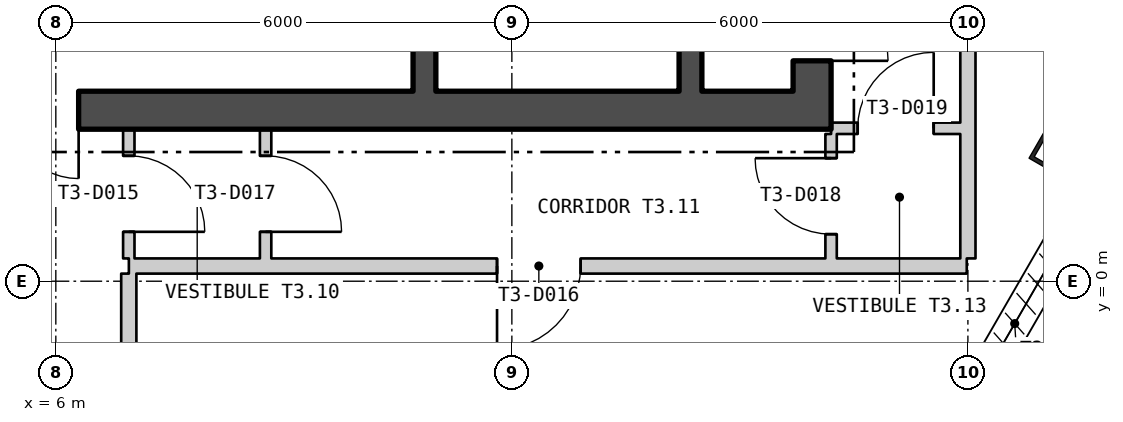
"""IFC4 building model, lengths in metres.
Left out: names, types, materials, properties, quantities, classifications, styles, units other than length and angle.
Written with IfcOpenShell. Run it as: python <this file> out.ifc"""

import sys

from ifc_helpers import new_model, si_unit, direction, frame, frame_2d, origin, origin_2d, place, context, subcontext, project, spatial, polyline, rectangle, hollow_rectangle, outline, extrude, element, fill, save


model = new_model("IFC4")
c1 = context("Model", 3, precision=1e-05, world=origin(), true_north=direction((0.0, 1.0)))
c2 = subcontext(c1, "Body", "Model", "MODEL_VIEW")
j1 = project(units=[si_unit("LENGTHUNIT", "METRE"), si_unit("PLANEANGLEUNIT", "RADIAN")], contexts=[c1])
p1 = place(None, origin())
s1 = spatial("IfcSite", under=j1, at=p1, CompositionType="ELEMENT")
p2 = place(p1, origin())
s2 = spatial("IfcBuilding", under=s1, at=p2, CompositionType="ELEMENT")
p3 = place(p2, frame((0.0, 0.0, 186.6)))
s3 = spatial("IfcBuildingStorey", under=s2, at=p3, CompositionType="ELEMENT", Elevation=186.6)
p4 = place(p3, frame((19.245, 1.682, 0.0), z_axis=(0.0, 0.0, 1.0), x_axis=(0.5, 0.866025403784, 0.0)))
e1 = element("IfcColumn", 1, at=p4, inside=s3, PredefinedType="COLUMN", context=c2, shape_type="SweptSolid", body=[
    extrude(hollow_rectangle(XDim=0.55, YDim=0.7, WallThickness=0.05, at=origin_2d()), origin(), (0.0, 0.0, 1.0), 6.0),
])
p5 = place(p3, frame((3.8, -26.219, -0.18), z_axis=(0.0, 0.0, 1.0), x_axis=(0.500000711659, 0.866024992908, 0.0)))
e2 = element("IfcWall", 2, at=p5, inside=s3, PredefinedType="SOLIDWALL", context=c2, shape_type="SweptSolid", body=[
    extrude(outline(polyline([(-0.13, -0.225), (45.87, -0.225), (45.61, 0.225), (0.13, 0.225), (-0.13, -0.225)])), origin(), (0.0, 0.0, 1.0), 6.0),
])
p6 = place(p5, frame((1.424, 0.0, 1.38)))
e3 = element("IfcOpeningElement", 3, at=p6, cuts=e2, PredefinedType="OPENING", context=c2, shape_type="SweptSolid", body=[
    extrude(rectangle(XDim=2.4, YDim=3.6, at=frame_2d((1.2, 1.8))), frame((0.0, 0.235, 0.0), z_axis=(0.0, -1.0, 0.0), x_axis=(1.0, 0.0, 0.0)), (0.0, 0.0, 1.0), 0.47),
])
p7 = place(p5, frame((5.893, 0.0, 1.38)))
e4 = element("IfcOpeningElement", 4, at=p7, cuts=e2, PredefinedType="OPENING", context=c2, shape_type="SweptSolid", body=[
    extrude(rectangle(XDim=2.4, YDim=3.6, at=frame_2d((1.2, 1.8))), frame((0.0, 0.235, 0.0), z_axis=(0.0, -1.0, 0.0), x_axis=(1.0, 0.0, 0.0)), (0.0, 0.0, 1.0), 0.47),
])
p8 = place(p5, frame((10.401, 0.0, 1.38)))
e5 = element("IfcOpeningElement", 5, at=p8, cuts=e2, PredefinedType="OPENING", context=c2, shape_type="SweptSolid", body=[
    extrude(rectangle(XDim=2.4, YDim=3.6, at=frame_2d((1.2, 1.8))), frame((0.0, 0.235, 0.0), z_axis=(0.0, -1.0, 0.0), x_axis=(1.0, 0.0, 0.0)), (0.0, 0.0, 1.0), 0.47),
])
p9 = place(p5, frame((14.909, 0.0, 1.38)))
e6 = element("IfcOpeningElement", 6, at=p9, cuts=e2, PredefinedType="OPENING", context=c2, shape_type="SweptSolid", body=[
    extrude(rectangle(XDim=2.4, YDim=3.6, at=frame_2d((1.2, 1.8))), frame((0.0, 0.235, 0.0), z_axis=(0.0, -1.0, 0.0), x_axis=(1.0, 0.0, 0.0)), (0.0, 0.0, 1.0), 0.47),
])
p10 = place(p5, frame((19.416, 0.0, 1.38)))
e7 = element("IfcOpeningElement", 7, at=p10, cuts=e2, PredefinedType="OPENING", context=c2, shape_type="SweptSolid", body=[
    extrude(rectangle(XDim=2.4, YDim=3.6, at=frame_2d((1.2, 1.8))), frame((0.0, 0.235, 0.0), z_axis=(0.0, -1.0, 0.0), x_axis=(1.0, 0.0, 0.0)), (0.0, 0.0, 1.0), 0.47),
])
p11 = place(p5, frame((23.924, 0.0, 1.38)))
e8 = element("IfcOpeningElement", 8, at=p11, cuts=e2, PredefinedType="OPENING", context=c2, shape_type="SweptSolid", body=[
    extrude(rectangle(XDim=2.4, YDim=3.6, at=frame_2d((1.2, 1.8))), frame((0.0, 0.235, 0.0), z_axis=(0.0, -1.0, 0.0), x_axis=(1.0, 0.0, 0.0)), (0.0, 0.0, 1.0), 0.47),
])
p12 = place(p5, frame((28.431, 0.0, 1.38)))
e9 = element("IfcOpeningElement", 9, at=p12, cuts=e2, PredefinedType="OPENING", context=c2, shape_type="SweptSolid", body=[
    extrude(rectangle(XDim=2.4, YDim=3.6, at=frame_2d((1.2, 1.8))), frame((0.0, 0.235, 0.0), z_axis=(0.0, -1.0, 0.0), x_axis=(1.0, 0.0, 0.0)), (0.0, 0.0, 1.0), 0.47),
])
p13 = place(p5, frame((32.939, 0.0, 1.38)))
e10 = element("IfcOpeningElement", 10, at=p13, cuts=e2, PredefinedType="OPENING", context=c2, shape_type="SweptSolid", body=[
    extrude(rectangle(XDim=2.4, YDim=3.6, at=frame_2d((1.2, 1.8))), frame((0.0, 0.235, 0.0), z_axis=(0.0, -1.0, 0.0), x_axis=(1.0, 0.0, 0.0)), (0.0, 0.0, 1.0), 0.47),
])
p14 = place(p5, frame((37.447, 0.0, 1.38)))
e11 = element("IfcOpeningElement", 11, at=p14, cuts=e2, PredefinedType="OPENING", context=c2, shape_type="SweptSolid", body=[
    extrude(rectangle(XDim=2.4, YDim=3.6, at=frame_2d((1.2, 1.8))), frame((0.0, 0.235, 0.0), z_axis=(0.0, -1.0, 0.0), x_axis=(1.0, 0.0, 0.0)), (0.0, 0.0, 1.0), 0.47),
])
p15 = place(p5, frame((41.916, 0.0, 1.38)))
e12 = element("IfcOpeningElement", 12, at=p15, cuts=e2, PredefinedType="OPENING", context=c2, shape_type="SweptSolid", body=[
    extrude(rectangle(XDim=2.4, YDim=3.6, at=frame_2d((1.2, 1.8))), frame((0.0, 0.235, 0.0), z_axis=(0.0, -1.0, 0.0), x_axis=(1.0, 0.0, 0.0)), (0.0, 0.0, 1.0), 0.47),
])
p16 = place(p3, frame((-16.2, 2.25, 0.0), z_axis=(0.0, 0.0, 1.0), x_axis=(1.0, 0.0, 0.0)))
e13 = element("IfcWall", 13, at=p16, inside=s3, PredefinedType="SHEAR", context=c2, shape_type="SweptSolid", body=[
    extrude(rectangle(XDim=32.4, YDim=0.5, at=frame_2d((16.2, 0.0))), origin(), (0.0, 0.0, 1.0), 5.8),
])
p17 = place(p16, frame((10.7, 0.0, 0.0)))
e14 = element("IfcOpeningElement", 14, at=p17, cuts=e13, PredefinedType="OPENING", context=c2, shape_type="SweptSolid", body=[
    extrude(rectangle(XDim=1.8, YDim=2.4, at=frame_2d((0.9, 1.2))), frame((0.0, 0.26, 0.0), z_axis=(0.0, -1.0, 0.0), x_axis=(1.0, 0.0, 0.0)), (0.0, 0.0, 1.0), 0.52),
])
p18 = place(p16, frame((20.7, 0.0, 0.0)))
e15 = element("IfcOpeningElement", 15, at=p18, cuts=e13, PredefinedType="OPENING", context=c2, shape_type="SweptSolid", body=[
    extrude(rectangle(XDim=1.8, YDim=2.4, at=frame_2d((0.9, 1.2))), frame((0.0, 0.26, 0.0), z_axis=(0.0, -1.0, 0.0), x_axis=(1.0, 0.0, 0.0)), (0.0, 0.0, 1.0), 0.52),
])
p19 = place(p3, frame((15.95, 2.5, 0.0), z_axis=(0.0, 0.0, 1.0), x_axis=(0.0, 1.0, 0.0)))
e16 = element("IfcWall", 16, at=p19, inside=s3, PredefinedType="SHEAR", context=c2, shape_type="SweptSolid", body=[
    extrude(rectangle(XDim=15.0, YDim=0.5, at=frame_2d((7.5, 0.0))), origin(), (0.0, 0.0, 1.0), 5.8),
])
p20 = place(p19, frame((4.35, 0.0, 0.0)))
e17 = element("IfcOpeningElement", 17, at=p20, cuts=e16, PredefinedType="OPENING", context=c2, shape_type="SweptSolid", body=[
    extrude(rectangle(XDim=1.5, YDim=2.1, at=frame_2d((0.75, 1.05))), frame((0.0, 0.26, 0.0), z_axis=(0.0, -1.0, 0.0), x_axis=(1.0, 0.0, 0.0)), (0.0, 0.0, 1.0), 0.52),
])
p21 = place(p19, frame((0.4, 0.0, 0.0)))
e18 = element("IfcOpeningElement", 18, at=p21, cuts=e16, PredefinedType="OPENING", context=c2, shape_type="SweptSolid", body=[
    extrude(rectangle(XDim=1.0, YDim=2.1, at=frame_2d((0.5, 1.05))), frame((0.0, 0.26, 0.0), z_axis=(0.0, -1.0, 0.0), x_axis=(1.0, 0.0, 0.0)), (0.0, 0.0, 1.0), 0.52),
])
p22 = place(p19, frame((2.563, 0.0, 0.0)))
e19 = element("IfcOpeningElement", 19, at=p22, cuts=e16, PredefinedType="OPENING", context=c2, shape_type="SweptSolid", body=[
    extrude(rectangle(XDim=0.9, YDim=2.1, at=frame_2d((0.45, 1.05))), frame((0.0, 0.26, 0.0), z_axis=(0.0, -1.0, 0.0), x_axis=(1.0, 0.0, 0.0)), (0.0, 0.0, 1.0), 0.52),
])
p23 = place(p19, frame((7.409, 0.0, 0.0)))
e20 = element("IfcOpeningElement", 20, at=p23, cuts=e16, PredefinedType="OPENING", context=c2, shape_type="SweptSolid", body=[
    extrude(rectangle(XDim=0.9, YDim=2.1, at=frame_2d((0.45, 1.05))), frame((0.0, 0.26, 0.0), z_axis=(0.0, -1.0, 0.0), x_axis=(1.0, 0.0, 0.0)), (0.0, 0.0, 1.0), 0.52),
])
p24 = place(p19, frame((11.984, 0.0, 0.0)))
e21 = element("IfcOpeningElement", 21, at=p24, cuts=e16, PredefinedType="OPENING", context=c2, shape_type="SweptSolid", body=[
    extrude(rectangle(XDim=0.9, YDim=2.1, at=frame_2d((0.45, 1.05))), frame((0.0, 0.26, 0.0), z_axis=(0.0, -1.0, 0.0), x_axis=(1.0, 0.0, 0.0)), (0.0, 0.0, 1.0), 0.52),
])
p25 = place(p3, frame((10.85, 2.5, 0.0), z_axis=(0.0, 0.0, 1.0), x_axis=(0.0, 1.0, 0.0)))
e22 = element("IfcWall", 22, at=p25, inside=s3, PredefinedType="SHEAR", context=c2, shape_type="SweptSolid", body=[
    extrude(rectangle(XDim=15.0, YDim=0.3, at=frame_2d((7.5, 0.0))), origin(), (0.0, 0.0, 1.0), 5.8),
])
p26 = place(p25, frame((3.475, 0.0, 0.0)))
e23 = element("IfcOpeningElement", 23, at=p26, cuts=e22, PredefinedType="OPENING", context=c2, shape_type="SweptSolid", body=[
    extrude(rectangle(XDim=1.25, YDim=2.1, at=frame_2d((0.625, 1.05))), frame((0.0, 0.16, 0.0), z_axis=(0.0, -1.0, 0.0), x_axis=(1.0, 0.0, 0.0)), (0.0, 0.0, 1.0), 0.32),
])
p27 = place(p25, frame((1.125, 0.0, 0.0)))
e24 = element("IfcOpeningElement", 24, at=p27, cuts=e22, PredefinedType="OPENING", context=c2, shape_type="SweptSolid", body=[
    extrude(rectangle(XDim=1.0, YDim=2.1, at=frame_2d((0.5, 1.05))), frame((0.0, 0.16, 0.0), z_axis=(0.0, -1.0, 0.0), x_axis=(1.0, 0.0, 0.0)), (0.0, 0.0, 1.0), 0.32),
])
p28 = place(p3, frame((14.35, 2.5, 0.0), z_axis=(0.0, 0.0, 1.0), x_axis=(0.0, 1.0, 0.0)))
e25 = element("IfcWall", 25, at=p28, inside=s3, PredefinedType="SHEAR", context=c2, shape_type="SweptSolid", body=[
    extrude(rectangle(XDim=15.0, YDim=0.3, at=frame_2d((7.5, 0.0))), origin(), (0.0, 0.0, 1.0), 5.8),
])
p29 = place(p28, frame((4.35, 0.0, 0.0)))
e26 = element("IfcOpeningElement", 26, at=p29, cuts=e25, PredefinedType="OPENING", context=c2, shape_type="SweptSolid", body=[
    extrude(rectangle(XDim=1.5, YDim=2.1, at=frame_2d((0.75, 1.05))), frame((0.0, 0.16, 0.0), z_axis=(0.0, -1.0, 0.0), x_axis=(1.0, 0.0, 0.0)), (0.0, 0.0, 1.0), 0.32),
])
p30 = place(p3, frame((6.96, -1.1, 0.0), z_axis=(0.0, 0.0, 1.0), x_axis=(0.0, 1.0, 0.0)))
e27 = element("IfcWall", 27, at=p30, inside=s3, PredefinedType="PARTITIONING", context=c2, shape_type="SweptSolid", body=[
    extrude(rectangle(XDim=1.2, YDim=0.2, at=frame_2d((0.6, 0.0))), origin(), (0.0, 0.0, 1.0), 5.8),
])
p31 = place(p3, frame((6.96, 0.3, 0.0), z_axis=(0.0, 0.0, 1.0), x_axis=(0.0, 1.0, 0.0)))
e28 = element("IfcWall", 28, at=p31, inside=s3, PredefinedType="PARTITIONING", context=c2, shape_type="SweptSolid", body=[
    extrude(rectangle(XDim=1.7, YDim=0.15, at=frame_2d((0.85, 0.0))), origin(), (0.0, 0.0, 1.0), 5.8),
])
p32 = place(p31, frame((0.35, 0.0, 0.0)))
e29 = element("IfcOpeningElement", 29, at=p32, cuts=e28, PredefinedType="OPENING", context=c2, shape_type="SweptSolid", body=[
    extrude(rectangle(XDim=1.0, YDim=2.1, at=frame_2d((0.5, 1.05))), frame((0.0, 0.085, 0.0), z_axis=(0.0, -1.0, 0.0), x_axis=(1.0, 0.0, 0.0)), (0.0, 0.0, 1.0), 0.17),
])
p33 = place(p3, frame((6.961, 0.2, 0.0), z_axis=(0.0, 0.0, 1.0), x_axis=(1.0, 0.0, 0.0)))
e30 = element("IfcWall", 30, at=p33, inside=s3, PredefinedType="PARTITIONING", context=c2, shape_type="SweptSolid", body=[
    extrude(rectangle(XDim=11.024, YDim=0.2, at=frame_2d((5.512, 0.0))), origin(), (0.0, 0.0, 1.0), 5.8),
])
p34 = place(p33, frame((4.844, 0.0, 0.0)))
e31 = element("IfcOpeningElement", 31, at=p34, cuts=e30, PredefinedType="OPENING", context=c2, shape_type="SweptSolid", body=[
    extrude(rectangle(XDim=1.1, YDim=2.1, at=frame_2d((0.55, 1.05))), frame((0.0, 0.11, 0.0), z_axis=(0.0, -1.0, 0.0), x_axis=(1.0, 0.0, 0.0)), (0.0, 0.0, 1.0), 0.22),
])
p35 = place(p3, frame((8.76, 0.3, 0.0), z_axis=(0.0, 0.0, 1.0), x_axis=(0.0, 1.0, 0.0)))
e32 = element("IfcWall", 32, at=p35, inside=s3, PredefinedType="PARTITIONING", context=c2, shape_type="SweptSolid", body=[
    extrude(rectangle(XDim=1.7, YDim=0.15, at=frame_2d((0.85, 0.0))), origin(), (0.0, 0.0, 1.0), 5.8),
])
p36 = place(p35, frame((0.35, 0.0, 0.0)))
e33 = element("IfcOpeningElement", 33, at=p36, cuts=e32, PredefinedType="OPENING", context=c2, shape_type="SweptSolid", body=[
    extrude(rectangle(XDim=1.0, YDim=2.1, at=frame_2d((0.5, 1.05))), frame((0.0, 0.085, 0.0), z_axis=(0.0, -1.0, 0.0), x_axis=(1.0, 0.0, 0.0)), (0.0, 0.0, 1.0), 0.17),
])
p37 = place(p3, frame((16.2, 0.3, 0.0), z_axis=(0.0, 0.0, 1.0), x_axis=(0.0, 1.0, 0.0)))
e34 = element("IfcWall", 34, at=p37, inside=s3, PredefinedType="PARTITIONING", context=c2, shape_type="SweptSolid", body=[
    extrude(rectangle(XDim=1.637, YDim=0.15, at=frame_2d((0.819, 0.0))), origin(), (0.0, 0.0, 1.0), 5.8),
])
p38 = place(p37, frame((0.319, 0.0, 0.0)))
e35 = element("IfcOpeningElement", 35, at=p38, cuts=e34, PredefinedType="OPENING", context=c2, shape_type="SweptSolid", body=[
    extrude(rectangle(XDim=1.0, YDim=2.1, at=frame_2d((0.5, 1.05))), frame((0.0, 0.085, 0.0), z_axis=(0.0, -1.0, 0.0), x_axis=(1.0, 0.0, 0.0)), (0.0, 0.0, 1.0), 0.17),
])
p39 = place(p3, frame((16.2, 2.012, 0.0), z_axis=(0.0, 0.0, 1.0), x_axis=(1.0, 0.0, 0.0)))
e36 = element("IfcWall", 36, at=p39, inside=s3, PredefinedType="PARTITIONING", context=c2, shape_type="SweptSolid", body=[
    extrude(rectangle(XDim=1.7, YDim=0.15, at=frame_2d((0.85, 0.0))), origin(), (0.0, 0.0, 1.0), 5.21),
])
p40 = place(p39, frame((0.35, 0.0, 0.0)))
e37 = element("IfcOpeningElement", 37, at=p40, cuts=e36, PredefinedType="OPENING", context=c2, shape_type="SweptSolid", body=[
    extrude(rectangle(XDim=1.0, YDim=2.1, at=frame_2d((0.5, 1.05))), frame((0.0, 0.085, 0.0), z_axis=(0.0, -1.0, 0.0), x_axis=(1.0, 0.0, 0.0)), (0.0, 0.0, 1.0), 0.17),
])
p41 = place(p3, frame((18.0, 0.3, 0.0), z_axis=(0.0, 0.0, 1.0), x_axis=(0.0, 1.0, 0.0)))
e38 = element("IfcWall", 38, at=p41, inside=s3, PredefinedType="PARTITIONING", context=c2, shape_type="SweptSolid", body=[
    extrude(rectangle(XDim=7.133, YDim=0.2, at=frame_2d((3.567, 0.0))), origin(), (0.0, 0.0, 1.0), 5.8),
])
p42 = place(p21, origin())
e39 = element("IfcDoor", 39, at=p42, inside=s3, OperationType="SINGLE_SWING_LEFT", PredefinedType="DOOR", context=c2, shape_type="SweptSolid", body=[
    extrude(rectangle(XDim=1.0, YDim=2.1, at=frame_2d((0.5, 1.05))), frame((0.0, 0.025, 0.0), z_axis=(0.0, -1.0, 0.0), x_axis=(1.0, 0.0, 0.0)), (0.0, 0.0, 1.0), 0.05),
])
fill(e18, e39)
p43 = place(p18, origin())
e40 = element("IfcDoor", 40, at=p43, inside=s3, OperationType="DOUBLE_DOOR_SINGLE_SWING", PredefinedType="DOOR", context=c2, shape_type="SweptSolid", body=[
    extrude(rectangle(XDim=1.8, YDim=2.4, at=frame_2d((0.9, 1.2))), frame((0.0, 0.025, 0.0), z_axis=(0.0, -1.0, 0.0), x_axis=(1.0, 0.0, 0.0)), (0.0, 0.0, 1.0), 0.05),
])
fill(e15, e40)
p44 = place(p32, origin())
e41 = element("IfcDoor", 41, at=p44, inside=s3, OperationType="SINGLE_SWING_LEFT", PredefinedType="DOOR", context=c2, shape_type="SweptSolid", body=[
    extrude(rectangle(XDim=1.0, YDim=2.1, at=frame_2d((0.5, 1.05))), frame((0.0, 0.025, 0.0), z_axis=(0.0, -1.0, 0.0), x_axis=(1.0, 0.0, 0.0)), (0.0, 0.0, 1.0), 0.05),
])
fill(e29, e41)
p45 = place(p34, origin())
e42 = element("IfcDoor", 42, at=p45, inside=s3, OperationType="SINGLE_SWING_LEFT", PredefinedType="DOOR", context=c2, shape_type="SweptSolid", body=[
    extrude(rectangle(XDim=1.1, YDim=2.1, at=frame_2d((0.55, 1.05))), frame((0.0, 0.025, 0.0), z_axis=(0.0, -1.0, 0.0), x_axis=(1.0, 0.0, 0.0)), (0.0, 0.0, 1.0), 0.05),
])
fill(e31, e42)
p46 = place(p36, origin())
e43 = element("IfcDoor", 43, at=p46, inside=s3, OperationType="SINGLE_SWING_LEFT", PredefinedType="DOOR", context=c2, shape_type="SweptSolid", body=[
    extrude(rectangle(XDim=1.0, YDim=2.1, at=frame_2d((0.5, 1.05))), frame((0.0, 0.025, 0.0), z_axis=(0.0, -1.0, 0.0), x_axis=(1.0, 0.0, 0.0)), (0.0, 0.0, 1.0), 0.05),
])
fill(e33, e43)
p47 = place(p38, origin())
e44 = element("IfcDoor", 44, at=p47, inside=s3, OperationType="SINGLE_SWING_LEFT", PredefinedType="DOOR", context=c2, shape_type="SweptSolid", body=[
    extrude(rectangle(XDim=1.0, YDim=2.1, at=frame_2d((0.5, 1.05))), frame((0.0, 0.025, 0.0), z_axis=(0.0, -1.0, 0.0), x_axis=(1.0, 0.0, 0.0)), (0.0, 0.0, 1.0), 0.05),
])
fill(e35, e44)
p48 = place(p40, origin())
e45 = element("IfcDoor", 45, at=p48, inside=s3, OperationType="SINGLE_SWING_LEFT", PredefinedType="DOOR", context=c2, shape_type="SweptSolid", body=[
    extrude(rectangle(XDim=1.0, YDim=2.1, at=frame_2d((0.5, 1.05))), frame((0.0, 0.025, 0.0), z_axis=(0.0, -1.0, 0.0), x_axis=(1.0, 0.0, 0.0)), (0.0, 0.0, 1.0), 0.05),
])
fill(e37, e45)
save(model, sys.argv[1])
